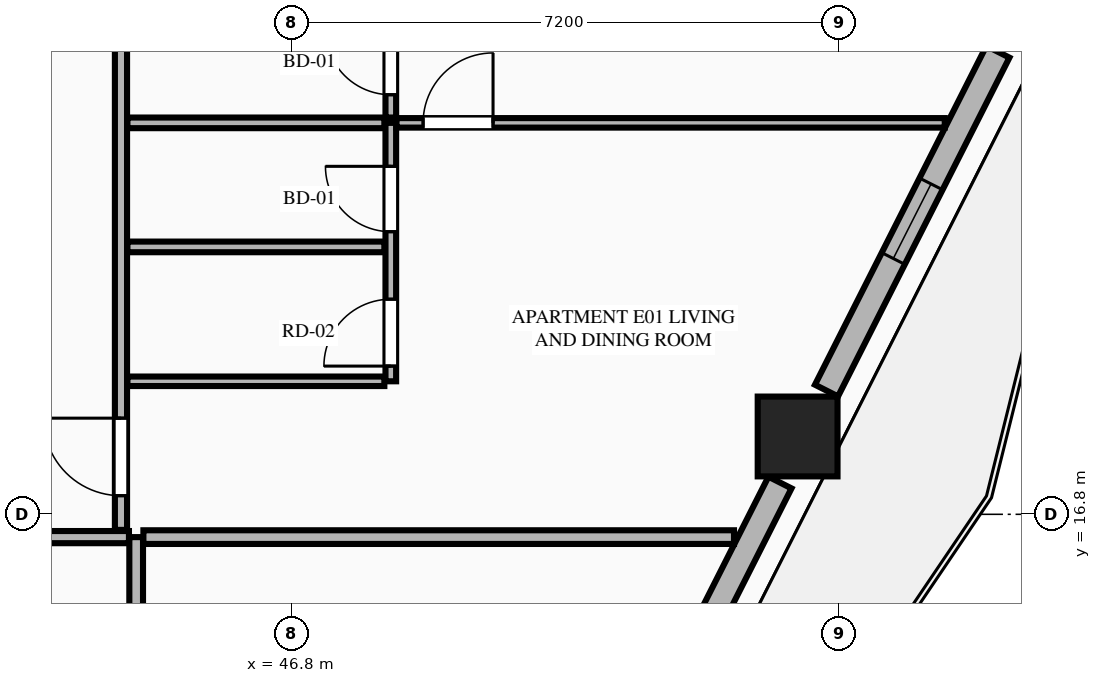
"""IFC4 building model, lengths in metres.
Left out: names, types, materials, properties, quantities, classifications, styles, units other than length and angle.
Written with IfcOpenShell. Run it as: python <this file> out.ifc"""

import sys

from ifc_helpers import new_model, si_unit, direction, frame, frame_2d, origin, origin_2d, place, context, subcontext, project, spatial, rectangle, extrude, element, fill, save


model = new_model("IFC4")
c1 = context("Model", 3, precision=1e-05, world=origin(), true_north=direction((0.0, 1.0)))
c2 = subcontext(c1, "Body", "Model", "MODEL_VIEW")
j1 = project(units=[si_unit("LENGTHUNIT", "METRE"), si_unit("PLANEANGLEUNIT", "RADIAN")], contexts=[c1])
p1 = place(None, origin())
s1 = spatial("IfcSite", under=j1, at=p1, CompositionType="ELEMENT")
p2 = place(p1, origin())
s2 = spatial("IfcBuilding", under=s1, at=p2, CompositionType="ELEMENT")
p3 = place(p2, frame((0.0, 0.0, 105.5)))
s3 = spatial("IfcBuildingStorey", under=s2, at=p3, CompositionType="ELEMENT", Elevation=105.5)
p4 = place(p3, frame((53.452, 17.824, 0.0), z_axis=(0.0, 0.0, 1.0), x_axis=(1.0, 0.0, 0.0)))
e1 = element("IfcColumn", 1, at=p4, inside=s3, PredefinedType="COLUMN", context=c2, shape_type="SweptSolid", body=[
    extrude(rectangle(XDim=1.05, YDim=1.05, at=origin_2d()), origin(), (0.0, 0.0, 1.0), 3.55),
])
p5 = place(p3, frame((50.863, 12.561, 0.0), z_axis=(0.0, 0.0, 1.0), x_axis=(0.451567731634, 0.892236842855, 0.0)))
e2 = element("IfcWall", 2, at=p5, inside=s3, PredefinedType="STANDARD", context=c2, shape_type="SweptSolid", body=[
    extrude(rectangle(XDim=5.219, YDim=0.34, at=frame_2d((2.61, 0.0))), origin(), (0.0, 0.0, 1.0), 2.797),
])
p6 = place(p5, frame((1.532, 0.0, 0.0)))
e3 = element("IfcOpeningElement", 3, at=p6, cuts=e2, PredefinedType="OPENING", context=c2, shape_type="SweptSolid", body=[
    extrude(rectangle(XDim=1.1, YDim=2.25, at=frame_2d((0.55, 1.125))), frame((0.0, 0.18, 0.0), z_axis=(0.0, -1.0, 0.0), x_axis=(1.0, 0.0, 0.0)), (0.0, 0.0, 1.0), 0.36),
])
p7 = place(p3, frame((53.832, 18.428, 0.0), z_axis=(0.0, 0.0, 1.0), x_axis=(0.451431617681, 0.892305718102, 0.0)))
e4 = element("IfcWall", 4, at=p7, inside=s3, PredefinedType="STANDARD", context=c2, shape_type="SweptSolid", body=[
    extrude(rectangle(XDim=4.995, YDim=0.34, at=frame_2d((2.498, 0.0))), origin(), (0.0, 0.0, 1.0), 2.797),
])
p8 = place(p7, frame((1.947, 0.0, 0.75)))
e5 = element("IfcOpeningElement", 5, at=p8, cuts=e4, PredefinedType="OPENING", context=c2, shape_type="SweptSolid", body=[
    extrude(rectangle(XDim=1.1, YDim=1.897, at=frame_2d((0.55, 0.948))), frame((0.0, 0.18, 0.0), z_axis=(0.0, -1.0, 0.0), x_axis=(1.0, 0.0, 0.0)), (0.0, 0.0, 1.0), 0.36),
])
p9 = place(p3, frame((44.75, 4.105, 0.0), z_axis=(0.0, 0.0, 1.0), x_axis=(0.0, 1.0, 0.0)))
e6 = element("IfcWall", 6, at=p9, inside=s3, PredefinedType="PARTITIONING", context=c2, shape_type="SweptSolid", body=[
    extrude(rectangle(XDim=12.395, YDim=0.18, at=frame_2d((6.198, 0.0))), origin(), (0.0, 0.0, 1.0), 3.34),
])
p10 = place(p3, frame((36.327, 16.5, 0.0), z_axis=(0.0, 0.0, 1.0), x_axis=(1.0, 0.0, 0.0)))
e7 = element("IfcWall", 7, at=p10, inside=s3, PredefinedType="PARTITIONING", context=c2, shape_type="SweptSolid", body=[
    extrude(rectangle(XDim=8.328, YDim=0.16, at=frame_2d((4.164, 0.0))), origin(), (0.0, 0.0, 1.0), 3.34),
])
p11 = place(p10, frame((6.073, 0.0, 0.0)))
e8 = element("IfcOpeningElement", 8, at=p11, cuts=e7, PredefinedType="OPENING", context=c2, shape_type="SweptSolid", body=[
    extrude(rectangle(XDim=1.02, YDim=2.25, at=frame_2d((0.51, 1.125))), frame((0.0, 0.09, 0.0), z_axis=(0.0, -1.0, 0.0), x_axis=(1.0, 0.0, 0.0)), (0.0, 0.0, 1.0), 0.18),
])
p12 = place(p3, frame((44.845, 16.5, 0.0), z_axis=(0.0, 0.0, 1.0), x_axis=(1.0, 0.0, 0.0)))
e9 = element("IfcWall", 9, at=p12, inside=s3, PredefinedType="PARTITIONING", context=c2, shape_type="SweptSolid", body=[
    extrude(rectangle(XDim=7.77, YDim=0.18, at=frame_2d((3.885, 0.0))), origin(), (0.0, 0.0, 1.0), 3.34),
])
p13 = place(p3, frame((44.55, 16.595, 0.0), z_axis=(0.0, 0.0, 1.0), x_axis=(0.0, 1.0, 0.0)))
e10 = element("IfcWall", 10, at=p13, inside=s3, PredefinedType="PARTITIONING", context=c2, shape_type="SweptSolid", body=[
    extrude(rectangle(XDim=9.586, YDim=0.16, at=frame_2d((4.793, 0.0))), origin(), (0.0, 0.0, 1.0), 3.34),
])
p14 = place(p13, frame((0.45, 0.0, 0.0)))
e11 = element("IfcOpeningElement", 11, at=p14, cuts=e10, PredefinedType="OPENING", context=c2, shape_type="SweptSolid", body=[
    extrude(rectangle(XDim=1.02, YDim=2.25, at=frame_2d((0.51, 1.125))), frame((0.0, 0.09, 0.0), z_axis=(0.0, -1.0, 0.0), x_axis=(1.0, 0.0, 0.0)), (0.0, 0.0, 1.0), 0.18),
])
p15 = place(p3, frame((44.635, 18.55, 0.0), z_axis=(0.0, 0.0, 1.0), x_axis=(1.0, 0.0, 0.0)))
e12 = element("IfcWall", 12, at=p15, inside=s3, PredefinedType="PARTITIONING", context=c2, shape_type="SweptSolid", body=[
    extrude(rectangle(XDim=3.38, YDim=0.125, at=frame_2d((1.69, 0.0))), origin(), (0.0, 0.0, 1.0), 2.722),
])
p16 = place(p3, frame((48.1, 18.55, 0.0), z_axis=(0.0, 0.0, 1.0), x_axis=(0.0, 1.0, 0.0)))
e13 = element("IfcWall", 13, at=p16, inside=s3, PredefinedType="PLUMBINGWALL", context=c2, shape_type="SweptSolid", body=[
    extrude(rectangle(XDim=3.4, YDim=0.14, at=frame_2d((1.7, 0.0))), origin(), (0.0, 0.0, 1.0), 3.34),
])
p17 = place(p16, frame((0.2, 0.0, 0.0)))
e14 = element("IfcOpeningElement", 14, at=p17, cuts=e13, PredefinedType="OPENING", context=c2, shape_type="SweptSolid", body=[
    extrude(rectangle(XDim=0.88, YDim=2.15, at=frame_2d((0.44, 1.075))), frame((0.0, 0.08, 0.0), z_axis=(0.0, -1.0, 0.0), x_axis=(1.0, 0.0, 0.0)), (0.0, 0.0, 1.0), 0.16),
])
p18 = place(p16, frame((1.968, 0.0, 0.0)))
e15 = element("IfcOpeningElement", 15, at=p18, cuts=e13, PredefinedType="OPENING", context=c2, shape_type="SweptSolid", body=[
    extrude(rectangle(XDim=0.86, YDim=2.1, at=frame_2d((0.43, 1.05))), frame((0.0, 0.08, 0.0), z_axis=(0.0, -1.0, 0.0), x_axis=(1.0, 0.0, 0.0)), (0.0, 0.0, 1.0), 0.16),
])
p19 = place(p3, frame((48.1, 22.02, 0.0), z_axis=(0.0, 0.0, 1.0), x_axis=(0.0, 1.0, 0.0)))
e16 = element("IfcWall", 16, at=p19, inside=s3, PredefinedType="PLUMBINGWALL", context=c2, shape_type="SweptSolid", body=[
    extrude(rectangle(XDim=4.161, YDim=0.14, at=frame_2d((2.081, 0.0))), origin(), (0.0, 0.0, 1.0), 3.34),
])
p20 = place(p19, frame((0.3, 0.0, 0.0)))
e17 = element("IfcOpeningElement", 17, at=p20, cuts=e16, PredefinedType="OPENING", context=c2, shape_type="SweptSolid", body=[
    extrude(rectangle(XDim=0.86, YDim=2.1, at=frame_2d((0.43, 1.05))), frame((0.0, 0.08, 0.0), z_axis=(0.0, -1.0, 0.0), x_axis=(1.0, 0.0, 0.0)), (0.0, 0.0, 1.0), 0.16),
])
p21 = place(p3, frame((44.635, 21.95, 0.0), z_axis=(0.0, 0.0, 1.0), x_axis=(1.0, 0.0, 0.0)))
e18 = element("IfcWall", 18, at=p21, inside=s3, PredefinedType="PLUMBINGWALL", context=c2, shape_type="SweptSolid", body=[
    extrude(rectangle(XDim=3.38, YDim=0.14, at=frame_2d((1.69, 0.0))), origin(), (0.0, 0.0, 1.0), 3.34),
])
p22 = place(p3, frame((48.175, 21.95, 0.0), z_axis=(0.0, 0.0, 1.0), x_axis=(1.0, 0.0, 0.0)))
e19 = element("IfcWall", 19, at=p22, inside=s3, PredefinedType="PARTITIONING", context=c2, shape_type="SweptSolid", body=[
    extrude(rectangle(XDim=7.213, YDim=0.125, at=frame_2d((3.606, 0.0))), origin(), (0.0, 0.0, 1.0), 3.34),
])
p23 = place(p22, frame((0.35, 0.0, 0.0)))
e20 = element("IfcOpeningElement", 20, at=p23, cuts=e19, PredefinedType="OPENING", context=c2, shape_type="SweptSolid", body=[
    extrude(rectangle(XDim=0.92, YDim=2.15, at=frame_2d((0.46, 1.075))), frame((0.0, 0.073, 0.0), z_axis=(0.0, -1.0, 0.0), x_axis=(1.0, 0.0, 0.0)), (0.0, 0.0, 1.0), 0.145),
])
p24 = place(p3, frame((44.635, 20.318, 0.0), z_axis=(0.0, 0.0, 1.0), x_axis=(1.0, 0.0, 0.0)))
e21 = element("IfcWall", 21, at=p24, inside=s3, PredefinedType="PLUMBINGWALL", context=c2, shape_type="SweptSolid", body=[
    extrude(rectangle(XDim=3.38, YDim=0.14, at=frame_2d((1.69, 0.0))), origin(), (0.0, 0.0, 1.0), 3.34),
])
p25 = place(p8, origin())
e22 = element("IfcWindow", 22, at=p25, inside=s3, PartitioningType="SINGLE_PANEL", PredefinedType="WINDOW", context=c2, shape_type="SweptSolid", body=[
    extrude(rectangle(XDim=1.1, YDim=1.897, at=frame_2d((0.55, 0.948))), frame((0.0, 0.03, 0.0), z_axis=(0.0, -1.0, 0.0), x_axis=(1.0, 0.0, 0.0)), (0.0, 0.0, 1.0), 0.06),
])
fill(e5, e22)
p26 = place(p17, origin())
e23 = element("IfcDoor", 23, at=p26, inside=s3, OperationType="SINGLE_SWING_LEFT", PredefinedType="DOOR", context=c2, shape_type="SweptSolid", body=[
    extrude(rectangle(XDim=0.88, YDim=2.15, at=frame_2d((0.44, 1.075))), frame((0.0, 0.025, 0.0), z_axis=(0.0, -1.0, 0.0), x_axis=(1.0, 0.0, 0.0)), (0.0, 0.0, 1.0), 0.05),
])
fill(e14, e23)
p27 = place(p18, origin())
e24 = element("IfcDoor", 24, at=p27, inside=s3, OperationType="SINGLE_SWING_RIGHT", PredefinedType="DOOR", context=c2, shape_type="SweptSolid", body=[
    extrude(rectangle(XDim=0.86, YDim=2.1, at=frame_2d((0.43, 1.05))), frame((0.0, 0.025, 0.0), z_axis=(0.0, -1.0, 0.0), x_axis=(1.0, 0.0, 0.0)), (0.0, 0.0, 1.0), 0.05),
])
fill(e15, e24)
p28 = place(p20, origin())
e25 = element("IfcDoor", 25, at=p28, inside=s3, OperationType="SINGLE_SWING_RIGHT", PredefinedType="DOOR", context=c2, shape_type="SweptSolid", body=[
    extrude(rectangle(XDim=0.86, YDim=2.1, at=frame_2d((0.43, 1.05))), frame((0.0, 0.025, 0.0), z_axis=(0.0, -1.0, 0.0), x_axis=(1.0, 0.0, 0.0)), (0.0, 0.0, 1.0), 0.05),
])
fill(e17, e25)
p29 = place(p14, origin())
e26 = element("IfcDoor", 26, at=p29, inside=s3, OperationType="SINGLE_SWING_RIGHT", PredefinedType="DOOR", context=c2, shape_type="SweptSolid", body=[
    extrude(rectangle(XDim=1.02, YDim=2.25, at=frame_2d((0.51, 1.125))), frame((0.0, 0.025, 0.0), z_axis=(0.0, -1.0, 0.0), x_axis=(1.0, 0.0, 0.0)), (0.0, 0.0, 1.0), 0.05),
])
fill(e11, e26)
p30 = place(p23, origin())
e27 = element("IfcDoor", 27, at=p30, inside=s3, OperationType="SINGLE_SWING_RIGHT", PredefinedType="DOOR", context=c2, shape_type="SweptSolid", body=[
    extrude(rectangle(XDim=0.92, YDim=2.15, at=frame_2d((0.46, 1.075))), frame((0.0, 0.025, 0.0), z_axis=(0.0, -1.0, 0.0), x_axis=(1.0, 0.0, 0.0)), (0.0, 0.0, 1.0), 0.05),
])
fill(e20, e27)
save(model, sys.argv[1])
